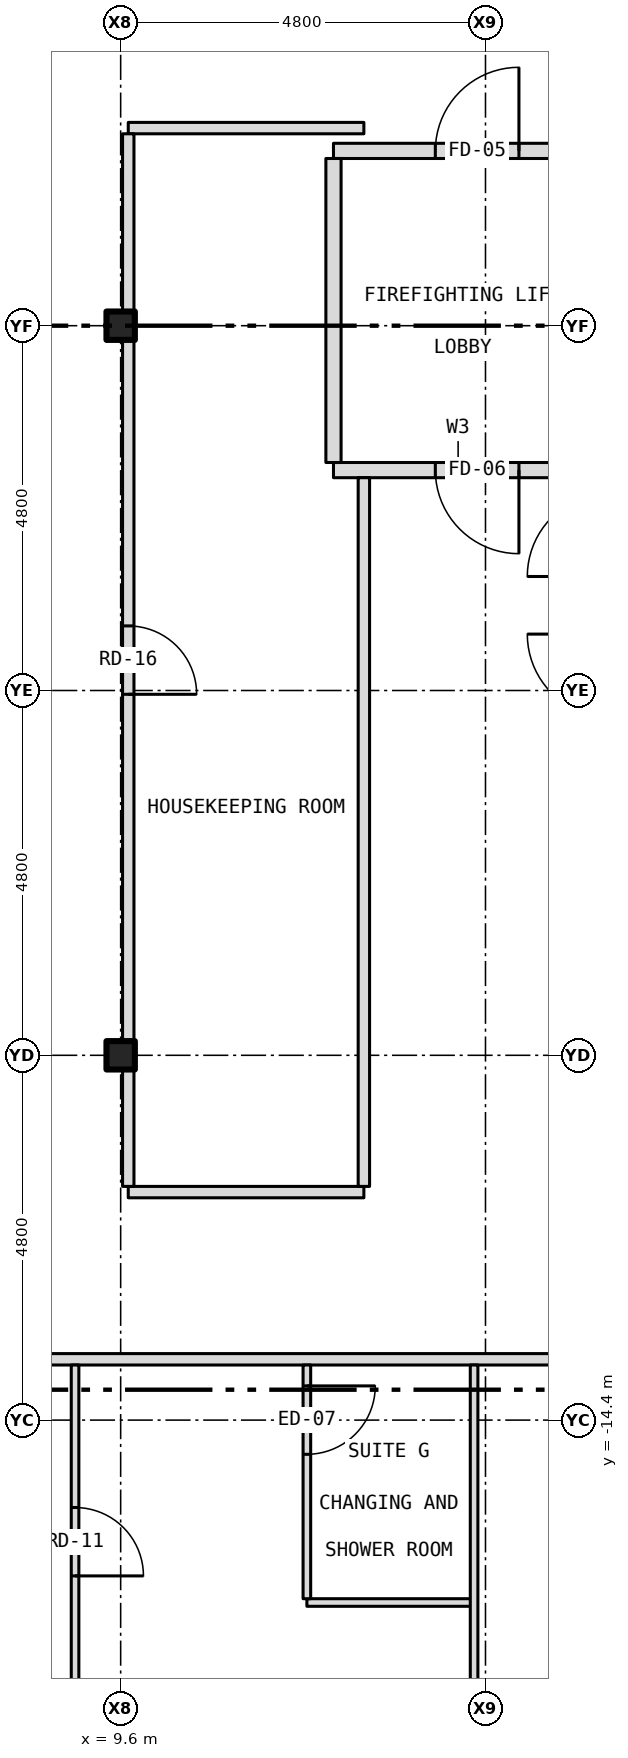
"""IFC4 building model, lengths in metres.
Left out: names, types, materials, properties, quantities, classifications, styles, units other than length and angle.
Written with IfcOpenShell. Run it as: python <this file> out.ifc"""

import sys

from ifc_helpers import new_model, si_unit, direction, frame, frame_2d, origin, origin_2d, place, context, subcontext, project, spatial, rectangle, i_section, extrude, element, fill, save


model = new_model("IFC4")
c1 = context("Model", 3, precision=1e-05, world=origin(), true_north=direction((0.0, 1.0)))
c2 = subcontext(c1, "Body", "Model", "MODEL_VIEW")
j1 = project(units=[si_unit("LENGTHUNIT", "METRE"), si_unit("PLANEANGLEUNIT", "RADIAN")], contexts=[c1])
p1 = place(None, origin())
s1 = spatial("IfcSite", under=j1, at=p1, CompositionType="ELEMENT")
p2 = place(p1, origin())
s2 = spatial("IfcBuilding", under=s1, at=p2, CompositionType="ELEMENT")
p3 = place(p2, frame((0.0, 0.0, 142.5)))
s3 = spatial("IfcBuildingStorey", under=s2, at=p3, CompositionType="ELEMENT", Elevation=142.5)
for number, where, z_axis, x_axis in (
    (1, (9.6, -9.6, -0.2), (0.0, 0.0, 1.0), (1.0, 0.0, 0.0)),
    (2, (9.6, 0.0, -0.2), (0.0, 0.0, 1.0), (1.0, 0.0, 0.0)),
):
    element("IfcColumn", number, at=place(p3, frame(where, z_axis=z_axis, x_axis=x_axis)), inside=s3, PredefinedType="COLUMN", context=c2, shape_type="SweptSolid", body=[
        extrude(i_section(OverallWidth=0.373, OverallDepth=0.373, WebThickness=0.016, FlangeThickness=0.026, at=origin_2d()), origin(), (0.0, 0.0, 1.0), 5.55),
    ])
p4 = place(p3, frame((12.05, -16.8, 0.0), z_axis=(0.0, 0.0, 1.0), x_axis=(1.0, 0.0, 0.0)))
e3 = element("IfcWall", 3, at=p4, inside=s3, PredefinedType="PARTITIONING", context=c2, shape_type="SweptSolid", body=[
    extrude(rectangle(XDim=2.2, YDim=0.1, at=frame_2d((1.1, 0.0))), origin(), (0.0, 0.0, 1.0), 5.35),
])
p5 = place(p3, frame((-15.8, -13.6, 0.0), z_axis=(0.0, 0.0, 1.0), x_axis=(1.0, 0.0, 0.0)))
e4 = element("IfcWall", 4, at=p5, inside=s3, PredefinedType="PARTITIONING", context=c2, shape_type="SweptSolid", body=[
    extrude(rectangle(XDim=31.6, YDim=0.15, at=frame_2d((15.8, 0.0))), origin(), (0.0, 0.0, 1.0), 5.35),
])
p6 = place(p5, frame((2.393, 0.0, 0.0)))
e5 = element("IfcOpeningElement", 5, at=p6, cuts=e4, PredefinedType="OPENING", context=c2, shape_type="SweptSolid", body=[
    extrude(rectangle(XDim=0.9, YDim=2.1, at=frame_2d((0.45, 1.05))), frame((0.0, 0.087, 0.0), z_axis=(0.0, -1.0, 0.0), x_axis=(1.0, 0.0, 0.0)), (0.0, 0.0, 1.0), 0.174),
])
p7 = place(p5, frame((13.216, 0.0, 0.0)))
e6 = element("IfcOpeningElement", 6, at=p7, cuts=e4, PredefinedType="OPENING", context=c2, shape_type="SweptSolid", body=[
    extrude(rectangle(XDim=0.9, YDim=2.1, at=frame_2d((0.45, 1.05))), frame((0.0, 0.087, 0.0), z_axis=(0.0, -1.0, 0.0), x_axis=(1.0, 0.0, 0.0)), (0.0, 0.0, 1.0), 0.174),
])
p8 = place(p5, frame((16.622, 0.0, 0.0)))
e7 = element("IfcOpeningElement", 7, at=p8, cuts=e4, PredefinedType="OPENING", context=c2, shape_type="SweptSolid", body=[
    extrude(rectangle(XDim=0.9, YDim=2.1, at=frame_2d((0.45, 1.05))), frame((0.0, 0.087, 0.0), z_axis=(0.0, -1.0, 0.0), x_axis=(1.0, 0.0, 0.0)), (0.0, 0.0, 1.0), 0.174),
])
p9 = place(p5, frame((22.228, 0.0, 0.0)))
e8 = element("IfcOpeningElement", 8, at=p9, cuts=e4, PredefinedType="OPENING", context=c2, shape_type="SweptSolid", body=[
    extrude(rectangle(XDim=0.9, YDim=2.1, at=frame_2d((0.45, 1.05))), frame((0.0, 0.087, 0.0), z_axis=(0.0, -1.0, 0.0), x_axis=(1.0, 0.0, 0.0)), (0.0, 0.0, 1.0), 0.174),
])
p10 = place(p3, frame((9.7, -11.4, 0.0), z_axis=(0.0, 0.0, 1.0), x_axis=(1.0, 0.0, 0.0)))
e9 = element("IfcWall", 9, at=p10, inside=s3, PredefinedType="PARTITIONING", context=c2, shape_type="SweptSolid", body=[
    extrude(rectangle(XDim=3.1, YDim=0.15, at=frame_2d((1.55, 0.0))), origin(), (0.0, 0.0, 1.0), 5.35),
])
p11 = place(p3, frame((12.4, -1.9, 0.0), z_axis=(0.0, 0.0, 1.0), x_axis=(1.0, 0.0, 0.0)))
e10 = element("IfcWall", 10, at=p11, inside=s3, PredefinedType="PARTITIONING", context=c2, shape_type="SweptSolid", body=[
    extrude(rectangle(XDim=3.28, YDim=0.2, at=frame_2d((1.64, 0.0))), origin(), (0.0, 0.0, 1.0), 5.35),
])
p12 = place(p11, frame((1.34, 0.0, 0.0)))
e11 = element("IfcOpeningElement", 11, at=p12, cuts=e10, PredefinedType="OPENING", context=c2, shape_type="SweptSolid", body=[
    extrude(rectangle(XDim=1.1, YDim=2.1, at=frame_2d((0.55, 1.05))), frame((0.0, 0.112, 0.0), z_axis=(0.0, -1.0, 0.0), x_axis=(1.0, 0.0, 0.0)), (0.0, 0.0, 1.0), 0.224),
])
p13 = place(p3, frame((12.4, 2.3, 0.0), z_axis=(0.0, 0.0, 1.0), x_axis=(1.0, 0.0, 0.0)))
e12 = element("IfcWall", 12, at=p13, inside=s3, PredefinedType="PARTITIONING", context=c2, shape_type="SweptSolid", body=[
    extrude(rectangle(XDim=3.28, YDim=0.2, at=frame_2d((1.64, 0.0))), origin(), (0.0, 0.0, 1.0), 5.35),
])
p14 = place(p13, frame((1.34, 0.0, 0.0)))
e13 = element("IfcOpeningElement", 13, at=p14, cuts=e12, PredefinedType="OPENING", context=c2, shape_type="SweptSolid", body=[
    extrude(rectangle(XDim=1.1, YDim=2.1, at=frame_2d((0.55, 1.05))), frame((0.0, 0.112, 0.0), z_axis=(0.0, -1.0, 0.0), x_axis=(1.0, 0.0, 0.0)), (0.0, 0.0, 1.0), 0.224),
])
p15 = place(p3, frame((9.7, 2.6, 0.0), z_axis=(0.0, 0.0, 1.0), x_axis=(1.0, 0.0, 0.0)))
e14 = element("IfcWall", 14, at=p15, inside=s3, PredefinedType="PARTITIONING", context=c2, shape_type="SweptSolid", body=[
    extrude(rectangle(XDim=3.1, YDim=0.15, at=frame_2d((1.55, 0.0))), origin(), (0.0, 0.0, 1.0), 5.35),
])
p16 = place(p3, frame((9.0, -22.03, 0.0), z_axis=(0.0, 0.0, 1.0), x_axis=(0.0, 1.0, 0.0)))
e15 = element("IfcWall", 15, at=p16, inside=s3, PredefinedType="PARTITIONING", context=c2, shape_type="SweptSolid", body=[
    extrude(rectangle(XDim=8.355, YDim=0.1, at=frame_2d((4.177, 0.0))), origin(), (0.0, 0.0, 1.0), 5.35),
])
p17 = place(p16, frame((5.58, 0.0, 0.0)))
e16 = element("IfcOpeningElement", 16, at=p17, cuts=e15, PredefinedType="OPENING", context=c2, shape_type="SweptSolid", body=[
    extrude(rectangle(XDim=0.9, YDim=2.1, at=frame_2d((0.45, 1.05))), frame((0.0, 0.062, 0.0), z_axis=(0.0, -1.0, 0.0), x_axis=(1.0, 0.0, 0.0)), (0.0, 0.0, 1.0), 0.124),
])
p18 = place(p3, frame((9.7, -11.325, 0.0), z_axis=(0.0, 0.0, 1.0), x_axis=(0.0, 1.0, 0.0)))
e17 = element("IfcWall", 17, at=p18, inside=s3, PredefinedType="PARTITIONING", context=c2, shape_type="SweptSolid", body=[
    extrude(rectangle(XDim=1.538, YDim=0.15, at=frame_2d((0.769, 0.0))), origin(), (0.0, 0.0, 1.0), 4.728),
])
p19 = place(p3, frame((9.7, -9.787, 0.0), z_axis=(0.0, 0.0, 1.0), x_axis=(0.0, 1.0, 0.0)))
e18 = element("IfcWall", 18, at=p19, inside=s3, PredefinedType="PARTITIONING", context=c2, shape_type="SweptSolid", body=[
    extrude(rectangle(XDim=0.374, YDim=0.15, at=frame_2d((0.187, 0.0))), origin(), (0.0, 0.0, 1.0), 5.35),
])
p20 = place(p3, frame((9.7, -9.413, 0.0), z_axis=(0.0, 0.0, 1.0), x_axis=(0.0, 1.0, 0.0)))
e19 = element("IfcWall", 19, at=p20, inside=s3, PredefinedType="PARTITIONING", context=c2, shape_type="SweptSolid", body=[
    extrude(rectangle(XDim=9.226, YDim=0.15, at=frame_2d((4.613, 0.0))), origin(), (0.0, 0.0, 1.0), 4.728),
])
p21 = place(p20, frame((4.563, 0.0, 0.0)))
e20 = element("IfcOpeningElement", 20, at=p21, cuts=e19, PredefinedType="OPENING", context=c2, shape_type="SweptSolid", body=[
    extrude(rectangle(XDim=0.9, YDim=2.1, at=frame_2d((0.45, 1.05))), frame((0.0, 0.087, 0.0), z_axis=(0.0, -1.0, 0.0), x_axis=(1.0, 0.0, 0.0)), (0.0, 0.0, 1.0), 0.174),
])
p22 = place(p3, frame((9.7, -0.187, 0.0), z_axis=(0.0, 0.0, 1.0), x_axis=(0.0, 1.0, 0.0)))
e21 = element("IfcWall", 21, at=p22, inside=s3, PredefinedType="PARTITIONING", context=c2, shape_type="SweptSolid", body=[
    extrude(rectangle(XDim=0.374, YDim=0.15, at=frame_2d((0.187, 0.0))), origin(), (0.0, 0.0, 1.0), 5.35),
])
p23 = place(p3, frame((9.7, 0.187, 0.0), z_axis=(0.0, 0.0, 1.0), x_axis=(0.0, 1.0, 0.0)))
e22 = element("IfcWall", 22, at=p23, inside=s3, PredefinedType="PARTITIONING", context=c2, shape_type="SweptSolid", body=[
    extrude(rectangle(XDim=2.338, YDim=0.15, at=frame_2d((1.169, 0.0))), origin(), (0.0, 0.0, 1.0), 4.728),
])
p24 = place(p3, frame((12.05, -16.75, 0.0), z_axis=(0.0, 0.0, 1.0), x_axis=(0.0, 1.0, 0.0)))
e23 = element("IfcWall", 23, at=p24, inside=s3, PredefinedType="PARTITIONING", context=c2, shape_type="SweptSolid", body=[
    extrude(rectangle(XDim=3.075, YDim=0.1, at=frame_2d((1.538, 0.0))), origin(), (0.0, 0.0, 1.0), 5.35),
])
p25 = place(p24, frame((1.9, 0.0, 0.0)))
e24 = element("IfcOpeningElement", 24, at=p25, cuts=e23, PredefinedType="OPENING", context=c2, shape_type="SweptSolid", body=[
    extrude(rectangle(XDim=0.9, YDim=2.1, at=frame_2d((0.45, 1.05))), frame((0.0, 0.062, 0.0), z_axis=(0.0, -1.0, 0.0), x_axis=(1.0, 0.0, 0.0)), (0.0, 0.0, 1.0), 0.124),
])
p26 = place(p3, frame((12.4, -1.8, 0.0), z_axis=(0.0, 0.0, 1.0), x_axis=(0.0, 1.0, 0.0)))
e25 = element("IfcWall", 25, at=p26, inside=s3, PredefinedType="PARTITIONING", context=c2, shape_type="SweptSolid", body=[
    extrude(rectangle(XDim=4.0, YDim=0.2, at=frame_2d((2.0, 0.0))), origin(), (0.0, 0.0, 1.0), 5.35),
])
p27 = place(p3, frame((12.8, -11.325, 0.0), z_axis=(0.0, 0.0, 1.0), x_axis=(0.0, 1.0, 0.0)))
e26 = element("IfcWall", 26, at=p27, inside=s3, PredefinedType="PARTITIONING", context=c2, shape_type="SweptSolid", body=[
    extrude(rectangle(XDim=9.325, YDim=0.15, at=frame_2d((4.663, 0.0))), origin(), (0.0, 0.0, 1.0), 5.35),
])
p28 = place(p3, frame((14.25, -22.03, 0.0), z_axis=(0.0, 0.0, 1.0), x_axis=(0.0, 1.0, 0.0)))
e27 = element("IfcWall", 27, at=p28, inside=s3, PredefinedType="PARTITIONING", context=c2, shape_type="SweptSolid", body=[
    extrude(rectangle(XDim=8.355, YDim=0.1, at=frame_2d((4.177, 0.0))), origin(), (0.0, 0.0, 1.0), 4.817),
])
p29 = place(p14, origin())
e28 = element("IfcDoor", 28, at=p29, inside=s3, OperationType="SINGLE_SWING_RIGHT", PredefinedType="DOOR", context=c2, shape_type="SweptSolid", body=[
    extrude(rectangle(XDim=1.1, YDim=2.1, at=frame_2d((0.55, 1.05))), frame((0.0, 0.025, 0.0), z_axis=(0.0, -1.0, 0.0), x_axis=(1.0, 0.0, 0.0)), (0.0, 0.0, 1.0), 0.05),
])
fill(e13, e28)
p30 = place(p12, origin())
e29 = element("IfcDoor", 29, at=p30, inside=s3, OperationType="SINGLE_SWING_RIGHT", PredefinedType="DOOR", context=c2, shape_type="SweptSolid", body=[
    extrude(rectangle(XDim=1.1, YDim=2.1, at=frame_2d((0.55, 1.05))), frame((0.0, 0.025, 0.0), z_axis=(0.0, -1.0, 0.0), x_axis=(1.0, 0.0, 0.0)), (0.0, 0.0, 1.0), 0.05),
])
fill(e11, e29)
p31 = place(p17, origin())
e30 = element("IfcDoor", 30, at=p31, inside=s3, OperationType="SINGLE_SWING_LEFT", PredefinedType="DOOR", context=c2, shape_type="SweptSolid", body=[
    extrude(rectangle(XDim=0.9, YDim=2.1, at=frame_2d((0.45, 1.05))), frame((0.0, 0.025, 0.0), z_axis=(0.0, -1.0, 0.0), x_axis=(1.0, 0.0, 0.0)), (0.0, 0.0, 1.0), 0.05),
])
fill(e16, e30)
p32 = place(p25, origin())
e31 = element("IfcDoor", 31, at=p32, inside=s3, OperationType="SINGLE_SWING_RIGHT", PredefinedType="DOOR", context=c2, shape_type="SweptSolid", body=[
    extrude(rectangle(XDim=0.9, YDim=2.1, at=frame_2d((0.45, 1.05))), frame((0.0, 0.025, 0.0), z_axis=(0.0, -1.0, 0.0), x_axis=(1.0, 0.0, 0.0)), (0.0, 0.0, 1.0), 0.05),
])
fill(e24, e31)
p33 = place(p21, origin())
e32 = element("IfcDoor", 32, at=p33, inside=s3, OperationType="SINGLE_SWING_LEFT", PredefinedType="DOOR", context=c2, shape_type="SweptSolid", body=[
    extrude(rectangle(XDim=0.9, YDim=2.1, at=frame_2d((0.45, 1.05))), frame((0.0, 0.025, 0.0), z_axis=(0.0, -1.0, 0.0), x_axis=(1.0, 0.0, 0.0)), (0.0, 0.0, 1.0), 0.05),
])
fill(e20, e32)
save(model, sys.argv[1])
